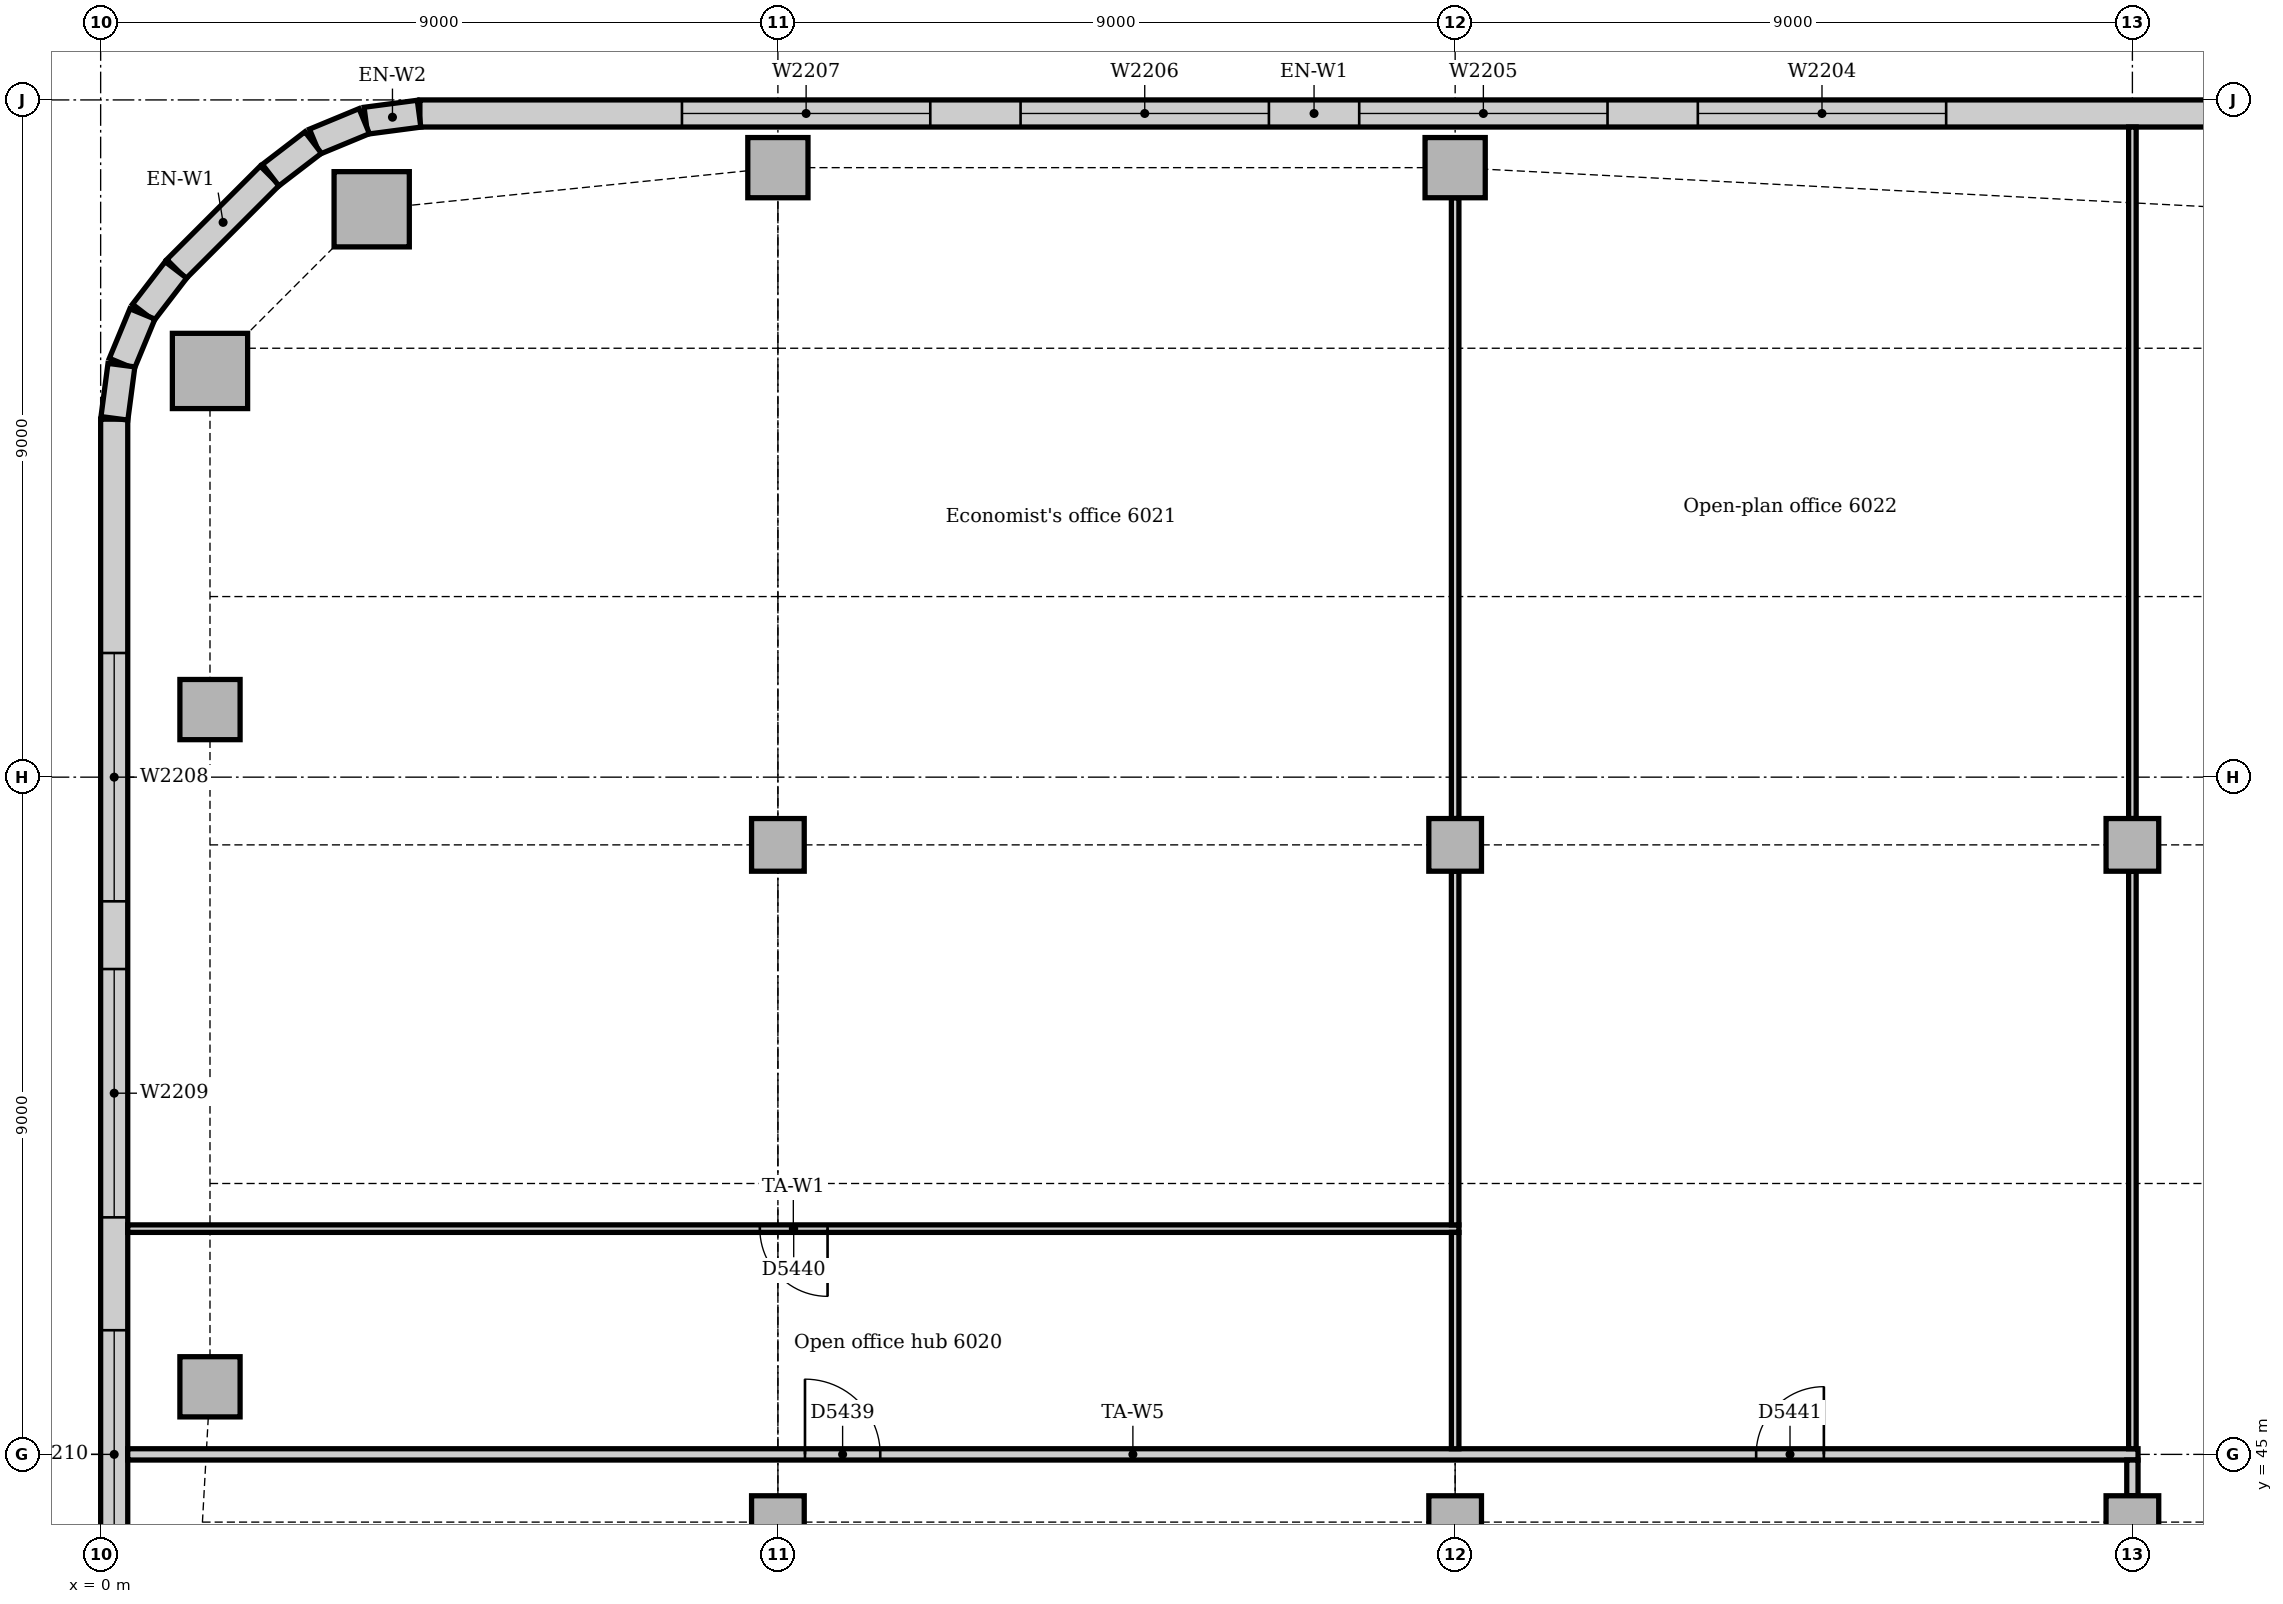
"""IFC4 building model, lengths in metres.
Left out: names, types, materials, properties, quantities, classifications, styles, units other than length and angle.
Written with IfcOpenShell. Run it as: python <this file> out.ifc"""

import sys

from ifc_helpers import new_model, si_unit, direction, frame, frame_2d, origin, origin_2d, place, context, subcontext, project, spatial, rectangle, extrude, element, fill, save


model = new_model("IFC4")
c1 = context("Model", 3, precision=1e-05, world=origin(), true_north=direction((0.0, 1.0)))
c2 = subcontext(c1, "Body", "Model", "MODEL_VIEW")
j1 = project(units=[si_unit("LENGTHUNIT", "METRE"), si_unit("PLANEANGLEUNIT", "RADIAN")], contexts=[c1])
p1 = place(None, origin())
s1 = spatial("IfcSite", under=j1, at=p1, CompositionType="ELEMENT")
p2 = place(p1, origin())
s2 = spatial("IfcBuilding", under=s1, at=p2, CompositionType="ELEMENT")
p3 = place(p2, frame((0.0, 0.0, 251.0)))
s3 = spatial("IfcBuildingStorey", under=s2, at=p3, CompositionType="ELEMENT", Elevation=251.0)
for number, where, z_axis, x_axis in (
    (1, (3.602, 61.547, 0.0), (0.0, 0.0, 1.0), (1.0, 0.0, 0.0)),
    (2, (1.453, 59.398, 0.0), (0.0, 0.0, 1.0), (1.0, 0.0, 0.0)),
):
    element("IfcColumn", number, at=place(p3, frame(where, z_axis=z_axis, x_axis=x_axis)), inside=s3, PredefinedType="COLUMN", context=c2, shape_type="SweptSolid", body=[
        extrude(rectangle(XDim=1.0, YDim=1.0, at=origin_2d()), origin(), (0.0, 0.0, 1.0), 3.85),
    ])
for number, where, z_axis, x_axis in (
    (3, (9.0, 62.1, 0.0), (0.0, 0.0, 1.0), (1.0, 0.0, 0.0)),
    (4, (18.0, 62.1, 0.0), (0.0, 0.0, 1.0), (1.0, 0.0, 0.0)),
    (5, (1.453, 45.898, 0.0), (0.0, 0.0, 1.0), (1.0, 0.0, 0.0)),
    (6, (1.453, 54.898, 0.0), (0.0, 0.0, 1.0), (1.0, 0.0, 0.0)),
):
    element("IfcColumn", number, at=place(p3, frame(where, z_axis=z_axis, x_axis=x_axis)), inside=s3, PredefinedType="COLUMN", context=c2, shape_type="SweptSolid", body=[
        extrude(rectangle(XDim=0.8, YDim=0.8, at=origin_2d()), origin(), (0.0, 0.0, 1.0), 3.85),
    ])
for number, where, z_axis, x_axis in (
    (7, (9.0, 44.1, 0.0), (0.0, 0.0, 1.0), (1.0, 0.0, 0.0)),
    (8, (9.0, 53.1, 0.0), (0.0, 0.0, 1.0), (1.0, 0.0, 0.0)),
    (9, (18.0, 44.1, 0.0), (0.0, 0.0, 1.0), (1.0, 0.0, 0.0)),
    (10, (18.0, 53.1, 0.0), (0.0, 0.0, 1.0), (1.0, 0.0, 0.0)),
    (11, (27.0, 44.1, 0.0), (0.0, 0.0, 1.0), (1.0, 0.0, 0.0)),
    (12, (27.0, 53.1, 0.0), (0.0, 0.0, 1.0), (1.0, 0.0, 0.0)),
):
    element("IfcColumn", number, at=place(p3, frame(where, z_axis=z_axis, x_axis=x_axis)), inside=s3, PredefinedType="COLUMN", context=c2, shape_type="SweptSolid", body=[
        extrude(rectangle(XDim=0.7, YDim=0.7, at=origin_2d()), origin(), (0.0, 0.0, 1.0), 3.85),
    ])
p4 = place(p3, frame((28.007, 62.82, 0.0), z_axis=(0.0, 0.0, 1.0), x_axis=(-1.0, 0.0, 0.0)))
e13 = element("IfcWall", 13, at=p4, inside=s3, PredefinedType="STANDARD", context=c2, shape_type="SweptSolid", body=[
    extrude(rectangle(XDim=23.765, YDim=0.36, at=frame_2d((11.882, 0.0))), origin(), (0.0, 0.0, 1.0), 3.85),
])
p5 = place(p4, frame((3.482, 0.0, 0.9)))
e14 = element("IfcOpeningElement", 14, at=p5, cuts=e13, PredefinedType="OPENING", context=c2, shape_type="SweptSolid", body=[
    extrude(rectangle(XDim=3.3, YDim=1.6, at=frame_2d((1.65, 0.8))), frame((0.0, 0.19, 0.0), z_axis=(0.0, -1.0, 0.0), x_axis=(1.0, 0.0, 0.0)), (0.0, 0.0, 1.0), 0.38),
])
p6 = place(p4, frame((7.982, 0.0, 0.9)))
e15 = element("IfcOpeningElement", 15, at=p6, cuts=e13, PredefinedType="OPENING", context=c2, shape_type="SweptSolid", body=[
    extrude(rectangle(XDim=3.3, YDim=1.6, at=frame_2d((1.65, 0.8))), frame((0.0, 0.19, 0.0), z_axis=(0.0, -1.0, 0.0), x_axis=(1.0, 0.0, 0.0)), (0.0, 0.0, 1.0), 0.38),
])
p7 = place(p4, frame((12.482, 0.0, 0.9)))
e16 = element("IfcOpeningElement", 16, at=p7, cuts=e13, PredefinedType="OPENING", context=c2, shape_type="SweptSolid", body=[
    extrude(rectangle(XDim=3.3, YDim=1.6, at=frame_2d((1.65, 0.8))), frame((0.0, 0.19, 0.0), z_axis=(0.0, -1.0, 0.0), x_axis=(1.0, 0.0, 0.0)), (0.0, 0.0, 1.0), 0.38),
])
p8 = place(p4, frame((16.982, 0.0, 0.9)))
e17 = element("IfcOpeningElement", 17, at=p8, cuts=e13, PredefinedType="OPENING", context=c2, shape_type="SweptSolid", body=[
    extrude(rectangle(XDim=3.3, YDim=1.6, at=frame_2d((1.65, 0.8))), frame((0.0, 0.19, 0.0), z_axis=(0.0, -1.0, 0.0), x_axis=(1.0, 0.0, 0.0)), (0.0, 0.0, 1.0), 0.38),
])
p9 = place(p3, frame((2.249, 61.994, 0.0), z_axis=(0.0, 0.0, 1.0), x_axis=(-0.707106781187, -0.707106781187, 0.0)))
e18 = element("IfcWall", 18, at=p9, inside=s3, PredefinedType="STANDARD", context=c2, shape_type="SweptSolid", body=[
    extrude(rectangle(XDim=1.757, YDim=0.36, at=frame_2d((0.879, 0.0))), origin(), (0.0, 0.0, 1.0), 3.85),
])
p10 = place(p3, frame((0.18, 58.757, 0.0), z_axis=(0.0, 0.0, 1.0), x_axis=(0.0, -1.0, 0.0)))
e19 = element("IfcWall", 19, at=p10, inside=s3, PredefinedType="STANDARD", context=c2, shape_type="SweptSolid", body=[
    extrude(rectangle(XDim=16.757, YDim=0.36, at=frame_2d((8.379, 0.0))), origin(), (0.0, 0.0, 1.0), 3.85),
])
p11 = place(p10, frame((3.107, 0.0, 0.9)))
e20 = element("IfcOpeningElement", 20, at=p11, cuts=e19, PredefinedType="OPENING", context=c2, shape_type="SweptSolid", body=[
    extrude(rectangle(XDim=3.3, YDim=1.6, at=frame_2d((1.65, 0.8))), frame((0.0, 0.19, 0.0), z_axis=(0.0, -1.0, 0.0), x_axis=(1.0, 0.0, 0.0)), (0.0, 0.0, 1.0), 0.38),
])
p12 = place(p10, frame((7.307, 0.0, 0.9)))
e21 = element("IfcOpeningElement", 21, at=p12, cuts=e19, PredefinedType="OPENING", context=c2, shape_type="SweptSolid", body=[
    extrude(rectangle(XDim=3.3, YDim=1.6, at=frame_2d((1.65, 0.8))), frame((0.0, 0.19, 0.0), z_axis=(0.0, -1.0, 0.0), x_axis=(1.0, 0.0, 0.0)), (0.0, 0.0, 1.0), 0.38),
])
p13 = place(p10, frame((12.107, 0.0, 0.9)))
e22 = element("IfcOpeningElement", 22, at=p13, cuts=e19, PredefinedType="OPENING", context=c2, shape_type="SweptSolid", body=[
    extrude(rectangle(XDim=3.3, YDim=1.6, at=frame_2d((1.65, 0.8))), frame((0.0, 0.19, 0.0), z_axis=(0.0, -1.0, 0.0), x_axis=(1.0, 0.0, 0.0)), (0.0, 0.0, 1.0), 0.38),
])
for number, where, z_axis, x_axis in (
    (23, (4.231, 62.817, 0.0), (0.0, 0.0, 1.0), (-0.991, -0.131, 0.0)),
    (24, (3.503, 62.718, 0.0), (0.0, 0.0, 1.0), (-0.924, -0.383, 0.0)),
):
    element("IfcWall", number, at=place(p3, frame(where, z_axis=z_axis, x_axis=x_axis)), inside=s3, PredefinedType="STANDARD", context=c2, shape_type="SweptSolid", body=[
        extrude(rectangle(XDim=0.713, YDim=0.36, at=frame_2d((0.356, 0.0))), origin(), (0.0, 0.0, 1.0), 3.85),
    ])
for number, where, z_axis, x_axis in (
    (25, (2.825, 62.434, 0.0), (0.0, 0.0, 1.0), (-0.793, -0.609, 0.0)),
    (26, (1.0, 60.741, 0.0), (0.0, 0.0, 1.0), (-0.609, -0.793, 0.0)),
):
    element("IfcWall", number, at=place(p3, frame(where, z_axis=z_axis, x_axis=x_axis)), inside=s3, PredefinedType="STANDARD", context=c2, shape_type="SweptSolid", body=[
        extrude(rectangle(XDim=0.713, YDim=0.36, at=frame_2d((0.357, 0.0))), origin(), (0.0, 0.0, 1.0), 3.85),
    ])
for number, where, z_axis, x_axis in (
    (27, (0.555, 60.156, 0.0), (0.0, 0.0, 1.0), (-0.383, -0.924, 0.0)),
    (28, (0.276, 59.476, 0.0), (0.0, 0.0, 1.0), (-0.131, -0.991, 0.0)),
):
    element("IfcWall", number, at=place(p3, frame(where, z_axis=z_axis, x_axis=x_axis)), inside=s3, PredefinedType="STANDARD", context=c2, shape_type="SweptSolid", body=[
        extrude(rectangle(XDim=0.713, YDim=0.36, at=frame_2d((0.356, 0.0))), origin(), (0.0, 0.0, 1.0), 3.85),
    ])
p14 = place(p3, frame((0.36, 45.0, 0.0), z_axis=(0.0, 0.0, 1.0), x_axis=(1.0, 0.0, 0.0)))
e29 = element("IfcWall", 29, at=p14, inside=s3, PredefinedType="PARTITIONING", context=c2, shape_type="SweptSolid", body=[
    extrude(rectangle(XDim=26.715, YDim=0.15, at=frame_2d((13.357, 0.0))), origin(), (0.0, 0.0, 1.0), 3.85),
])
p15 = place(p14, frame((9.0, 0.0, 0.0)))
e30 = element("IfcOpeningElement", 30, at=p15, cuts=e29, PredefinedType="OPENING", context=c2, shape_type="SweptSolid", body=[
    extrude(rectangle(XDim=1.0, YDim=2.1, at=frame_2d((0.5, 1.05))), frame((0.0, 0.085, 0.0), z_axis=(0.0, -1.0, 0.0), x_axis=(1.0, 0.0, 0.0)), (0.0, 0.0, 1.0), 0.17),
])
p16 = place(p14, frame((21.64, 0.0, 0.0)))
e31 = element("IfcOpeningElement", 31, at=p16, cuts=e29, PredefinedType="OPENING", context=c2, shape_type="SweptSolid", body=[
    extrude(rectangle(XDim=0.9, YDim=2.1, at=frame_2d((0.45, 1.05))), frame((0.0, 0.085, 0.0), z_axis=(0.0, -1.0, 0.0), x_axis=(1.0, 0.0, 0.0)), (0.0, 0.0, 1.0), 0.17),
])
p17 = place(p3, frame((27.0, 44.45, 0.0), z_axis=(0.0, 0.0, 1.0), x_axis=(0.0, 1.0, 0.0)))
e32 = element("IfcWall", 32, at=p17, inside=s3, PredefinedType="PARTITIONING", context=c2, shape_type="SweptSolid", body=[
    extrude(rectangle(XDim=0.475, YDim=0.15, at=frame_2d((0.237, 0.0))), origin(), (0.0, 0.0, 1.0), 3.85),
])
p18 = place(p3, frame((0.36, 48.0, 0.0), z_axis=(0.0, 0.0, 1.0), x_axis=(1.0, 0.0, 0.0)))
e33 = element("IfcWall", 33, at=p18, inside=s3, PredefinedType="PARTITIONING", context=c2, shape_type="SweptSolid", body=[
    extrude(rectangle(XDim=17.69, YDim=0.1, at=frame_2d((8.845, 0.0))), origin(), (0.0, 0.0, 1.0), 3.85),
])
p19 = place(p18, frame((8.4, 0.0, 0.0)))
e34 = element("IfcOpeningElement", 34, at=p19, cuts=e33, PredefinedType="OPENING", context=c2, shape_type="SweptSolid", body=[
    extrude(rectangle(XDim=0.9, YDim=2.1, at=frame_2d((0.45, 1.05))), frame((0.0, 0.06, 0.0), z_axis=(0.0, -1.0, 0.0), x_axis=(1.0, 0.0, 0.0)), (0.0, 0.0, 1.0), 0.12),
])
p20 = place(p3, frame((18.0, 45.075, 0.0), z_axis=(0.0, 0.0, 1.0), x_axis=(0.0, 1.0, 0.0)))
e35 = element("IfcWall", 35, at=p20, inside=s3, PredefinedType="PARTITIONING", context=c2, shape_type="SweptSolid", body=[
    extrude(rectangle(XDim=2.875, YDim=0.1, at=frame_2d((1.438, 0.0))), origin(), (0.0, 0.0, 1.0), 3.4),
])
p21 = place(p3, frame((18.0, 48.05, 0.0), z_axis=(0.0, 0.0, 1.0), x_axis=(0.0, 1.0, 0.0)))
e36 = element("IfcWall", 36, at=p21, inside=s3, PredefinedType="PARTITIONING", context=c2, shape_type="SweptSolid", body=[
    extrude(rectangle(XDim=4.7, YDim=0.1, at=frame_2d((2.35, 0.0))), origin(), (0.0, 0.0, 1.0), 3.4),
])
p22 = place(p3, frame((18.0, 53.45, 0.0), z_axis=(0.0, 0.0, 1.0), x_axis=(0.0, 1.0, 0.0)))
e37 = element("IfcWall", 37, at=p22, inside=s3, PredefinedType="PARTITIONING", context=c2, shape_type="SweptSolid", body=[
    extrude(rectangle(XDim=8.25, YDim=0.1, at=frame_2d((4.125, 0.0))), origin(), (0.0, 0.0, 1.0), 3.4),
])
p23 = place(p3, frame((27.0, 45.075, 0.0), z_axis=(0.0, 0.0, 1.0), x_axis=(0.0, 1.0, 0.0)))
e38 = element("IfcWall", 38, at=p23, inside=s3, PredefinedType="PARTITIONING", context=c2, shape_type="SweptSolid", body=[
    extrude(rectangle(XDim=7.675, YDim=0.1, at=frame_2d((3.837, 0.0))), origin(), (0.0, 0.0, 1.0), 3.4),
])
p24 = place(p3, frame((27.0, 53.45, 0.0), z_axis=(0.0, 0.0, 1.0), x_axis=(0.0, 1.0, 0.0)))
e39 = element("IfcWall", 39, at=p24, inside=s3, PredefinedType="PARTITIONING", context=c2, shape_type="SweptSolid", body=[
    extrude(rectangle(XDim=9.19, YDim=0.1, at=frame_2d((4.595, 0.0))), origin(), (0.0, 0.0, 1.0), 3.4),
])
p25 = place(p5, origin())
e40 = element("IfcWindow", 40, at=p25, inside=s3, PartitioningType="SINGLE_PANEL", PredefinedType="WINDOW", context=c2, shape_type="SweptSolid", body=[
    extrude(rectangle(XDim=3.3, YDim=1.6, at=frame_2d((1.65, 0.8))), frame((0.0, 0.13, 0.0), z_axis=(0.0, -1.0, 0.0), x_axis=(1.0, 0.0, 0.0)), (0.0, 0.0, 1.0), 0.06),
])
fill(e14, e40)
p26 = place(p6, origin())
e41 = element("IfcWindow", 41, at=p26, inside=s3, PartitioningType="SINGLE_PANEL", PredefinedType="WINDOW", context=c2, shape_type="SweptSolid", body=[
    extrude(rectangle(XDim=3.3, YDim=1.6, at=frame_2d((1.65, 0.8))), frame((0.0, 0.13, 0.0), z_axis=(0.0, -1.0, 0.0), x_axis=(1.0, 0.0, 0.0)), (0.0, 0.0, 1.0), 0.06),
])
fill(e15, e41)
p27 = place(p7, origin())
e42 = element("IfcWindow", 42, at=p27, inside=s3, PartitioningType="SINGLE_PANEL", PredefinedType="WINDOW", context=c2, shape_type="SweptSolid", body=[
    extrude(rectangle(XDim=3.3, YDim=1.6, at=frame_2d((1.65, 0.8))), frame((0.0, 0.13, 0.0), z_axis=(0.0, -1.0, 0.0), x_axis=(1.0, 0.0, 0.0)), (0.0, 0.0, 1.0), 0.06),
])
fill(e16, e42)
p28 = place(p8, origin())
e43 = element("IfcWindow", 43, at=p28, inside=s3, PartitioningType="SINGLE_PANEL", PredefinedType="WINDOW", context=c2, shape_type="SweptSolid", body=[
    extrude(rectangle(XDim=3.3, YDim=1.6, at=frame_2d((1.65, 0.8))), frame((0.0, 0.13, 0.0), z_axis=(0.0, -1.0, 0.0), x_axis=(1.0, 0.0, 0.0)), (0.0, 0.0, 1.0), 0.06),
])
fill(e17, e43)
p29 = place(p11, origin())
e44 = element("IfcWindow", 44, at=p29, inside=s3, PartitioningType="SINGLE_PANEL", PredefinedType="WINDOW", context=c2, shape_type="SweptSolid", body=[
    extrude(rectangle(XDim=3.3, YDim=1.6, at=frame_2d((1.65, 0.8))), frame((0.0, 0.13, 0.0), z_axis=(0.0, -1.0, 0.0), x_axis=(1.0, 0.0, 0.0)), (0.0, 0.0, 1.0), 0.06),
])
fill(e20, e44)
p30 = place(p12, origin())
e45 = element("IfcWindow", 45, at=p30, inside=s3, PartitioningType="SINGLE_PANEL", PredefinedType="WINDOW", context=c2, shape_type="SweptSolid", body=[
    extrude(rectangle(XDim=3.3, YDim=1.6, at=frame_2d((1.65, 0.8))), frame((0.0, 0.13, 0.0), z_axis=(0.0, -1.0, 0.0), x_axis=(1.0, 0.0, 0.0)), (0.0, 0.0, 1.0), 0.06),
])
fill(e21, e45)
p31 = place(p13, origin())
e46 = element("IfcWindow", 46, at=p31, inside=s3, PartitioningType="SINGLE_PANEL", PredefinedType="WINDOW", context=c2, shape_type="SweptSolid", body=[
    extrude(rectangle(XDim=3.3, YDim=1.6, at=frame_2d((1.65, 0.8))), frame((0.0, 0.13, 0.0), z_axis=(0.0, -1.0, 0.0), x_axis=(1.0, 0.0, 0.0)), (0.0, 0.0, 1.0), 0.06),
])
fill(e22, e46)
p32 = place(p15, origin())
e47 = element("IfcDoor", 47, at=p32, inside=s3, OperationType="SINGLE_SWING_LEFT", PredefinedType="DOOR", context=c2, shape_type="SweptSolid", body=[
    extrude(rectangle(XDim=1.0, YDim=2.1, at=frame_2d((0.5, 1.05))), frame((0.0, 0.025, 0.0), z_axis=(0.0, -1.0, 0.0), x_axis=(1.0, 0.0, 0.0)), (0.0, 0.0, 1.0), 0.05),
])
fill(e30, e47)
p33 = place(p19, frame((0.9, 0.0, 0.0), z_axis=(0.0, 0.0, 1.0), x_axis=(-1.0, 0.0, 0.0)))
e48 = element("IfcDoor", 48, at=p33, inside=s3, OperationType="SINGLE_SWING_LEFT", PredefinedType="DOOR", context=c2, shape_type="SweptSolid", body=[
    extrude(rectangle(XDim=0.9, YDim=2.1, at=frame_2d((0.45, 1.05))), frame((0.0, 0.025, 0.0), z_axis=(0.0, -1.0, 0.0), x_axis=(1.0, 0.0, 0.0)), (0.0, 0.0, 1.0), 0.05),
])
fill(e34, e48)
p34 = place(p16, origin())
e49 = element("IfcDoor", 49, at=p34, inside=s3, OperationType="SINGLE_SWING_RIGHT", PredefinedType="DOOR", context=c2, shape_type="SweptSolid", body=[
    extrude(rectangle(XDim=0.9, YDim=2.1, at=frame_2d((0.45, 1.05))), frame((0.0, 0.025, 0.0), z_axis=(0.0, -1.0, 0.0), x_axis=(1.0, 0.0, 0.0)), (0.0, 0.0, 1.0), 0.05),
])
fill(e31, e49)
save(model, sys.argv[1])
